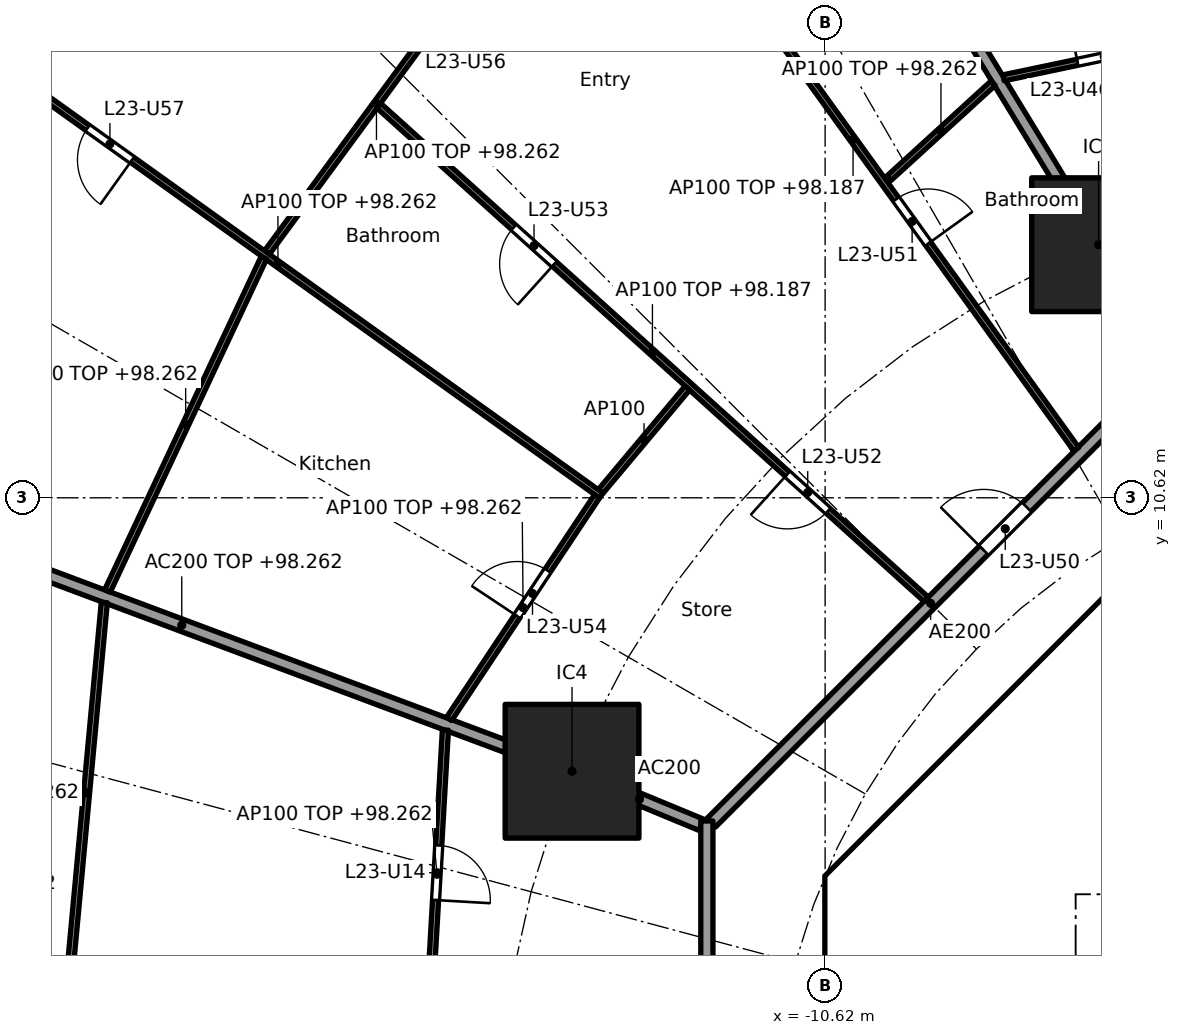
"""IFC4 building model, lengths in metres.
Left out: names, types, materials, properties, quantities, classifications, styles, units other than length and angle.
Written with IfcOpenShell. Run it as: python <this file> out.ifc"""

import sys

from ifc_helpers import new_model, si_unit, direction, frame, frame_2d, origin, origin_2d, place, context, subcontext, project, spatial, polyline, rectangle, outline, extrude, element, fill, save


model = new_model("IFC4")
c1 = context("Model", 3, precision=1e-05, world=origin(), true_north=direction((0.0, 1.0)))
c2 = subcontext(c1, "Body", "Model", "MODEL_VIEW")
j1 = project(units=[si_unit("LENGTHUNIT", "METRE"), si_unit("PLANEANGLEUNIT", "RADIAN")], contexts=[c1])
p1 = place(None, origin())
s1 = spatial("IfcSite", under=j1, at=p1, CompositionType="ELEMENT")
p2 = place(p1, origin())
s2 = spatial("IfcBuilding", under=s1, at=p2, CompositionType="ELEMENT")
p3 = place(p2, frame((0.0, 0.0, 95.5)))
s3 = spatial("IfcBuildingStorey", under=s2, at=p3, CompositionType="ELEMENT", Elevation=95.5)
for number, where, z_axis, x_axis in (
    (1, (-6.123, 14.782, 0.0), (0.0, 0.0, 1.0), (1.0, 0.0, 0.0)),
    (2, (-14.782, 6.123, 0.0), (0.0, 0.0, 1.0), (1.0, 0.0, 0.0)),
):
    element("IfcColumn", number, at=place(p3, frame(where, z_axis=z_axis, x_axis=x_axis)), inside=s3, PredefinedType="COLUMN", context=c2, shape_type="SweptSolid", body=[
        extrude(rectangle(XDim=2.2, YDim=2.2, at=origin_2d()), origin(), (0.0, 0.0, 1.0), 3.7),
    ])
p4 = place(p3, frame((-4.613, 9.988, 0.0), z_axis=(0.0, 0.0, 1.0), x_axis=(-0.707106781187, -0.707106781187, 0.0)))
e3 = element("IfcWall", 3, at=p4, inside=s3, PredefinedType="SHEAR", context=c2, shape_type="SweptSolid", body=[
    extrude(rectangle(XDim=7.602, YDim=0.6, at=frame_2d((3.801, 0.0))), origin(), (0.0, 0.0, 1.0), 3.44),
])
p5 = place(p4, frame((0.351, 0.0, 0.0)))
e4 = element("IfcOpeningElement", 4, at=p5, cuts=e3, PredefinedType="OPENING", context=c2, shape_type="SweptSolid", body=[
    extrude(rectangle(XDim=1.1, YDim=2.1, at=frame_2d((0.55, 1.05))), frame((0.0, 0.31, 0.0), z_axis=(0.0, -1.0, 0.0), x_axis=(1.0, 0.0, 0.0)), (0.0, 0.0, 1.0), 0.62),
])
p6 = place(p3, frame((-10.325, 3.801, 0.0), z_axis=(0.0, 0.0, 1.0), x_axis=(0.0, -1.0, 0.0)))
e5 = element("IfcWall", 5, at=p6, inside=s3, PredefinedType="SHEAR", context=c2, shape_type="SweptSolid", body=[
    extrude(rectangle(XDim=7.602, YDim=0.6, at=frame_2d((3.801, 0.0))), origin(), (0.0, 0.0, 1.0), 3.44),
])
p7 = place(p6, frame((0.651, 0.0, 0.0)))
e6 = element("IfcOpeningElement", 6, at=p7, cuts=e5, PredefinedType="OPENING", context=c2, shape_type="SweptSolid", body=[
    extrude(rectangle(XDim=1.5, YDim=2.1, at=frame_2d((0.75, 1.05))), frame((0.0, 0.31, 0.0), z_axis=(0.0, -1.0, 0.0), x_axis=(1.0, 0.0, 0.0)), (0.0, 0.0, 1.0), 0.62),
])
p8 = place(p6, frame((5.451, 0.0, 0.0)))
e7 = element("IfcOpeningElement", 7, at=p8, cuts=e5, PredefinedType="OPENING", context=c2, shape_type="SweptSolid", body=[
    extrude(rectangle(XDim=1.5, YDim=2.1, at=frame_2d((0.75, 1.05))), frame((0.0, 0.31, 0.0), z_axis=(0.0, -1.0, 0.0), x_axis=(1.0, 0.0, 0.0)), (0.0, 0.0, 1.0), 0.62),
])
p9 = place(p3, frame((-7.0, 4.1, 0.0), z_axis=(0.0, 0.0, 1.0), x_axis=(0.0, 1.0, 0.0)))
e8 = element("IfcWall", 8, at=p9, inside=s3, PredefinedType="PARTITIONING", context=c2, shape_type="SweptSolid", body=[
    extrude(rectangle(XDim=2.927, YDim=0.15, at=frame_2d((1.463, 0.0))), origin(), (0.0, 0.0, 1.0), 3.44),
])
p10 = place(p9, frame((1.051, 0.0, 0.0)))
e9 = element("IfcOpeningElement", 9, at=p10, cuts=e8, PredefinedType="OPENING", context=c2, shape_type="SweptSolid", body=[
    extrude(rectangle(XDim=0.9, YDim=2.1, at=frame_2d((0.45, 1.05))), frame((0.0, 0.085, 0.0), z_axis=(0.0, -1.0, 0.0), x_axis=(1.0, 0.0, 0.0)), (0.0, 0.0, 1.0), 0.17),
])
p11 = place(p3, origin())
e10 = element("IfcWall", 10, at=p11, inside=s3, PredefinedType="SHEAR", context=c2, shape_type="SweptSolid", body=[
    extrude(outline(polyline([(-10.2, 4.825), (-9.776, 4.401), (-10.025, 4.152), (-10.025, 3.801), (-10.625, 3.801), (-10.625, 4.401), (-10.2, 4.825)])), origin(), (0.0, 0.0, 1.0), 3.44),
])
p12 = place(p3, origin())
e11 = element("IfcWall", 11, at=p12, inside=s3, PredefinedType="SOLIDWALL", context=c2, shape_type="SweptSolid", body=[
    extrude(outline(polyline([(-6.5, 2.1), (-6.7, 2.1), (-6.7, 4.3), (6.7, 4.3), (6.7, 2.1), (6.5, 2.1), (6.5, 4.1), (4.5, 4.1), (4.5, 2.1), (4.3, 2.1), (4.3, 4.1), (2.3, 4.1), (2.3, 2.1), (2.1, 2.1), (2.1, 4.1), (0.1, 4.1), (0.1, 2.1), (-0.1, 2.1), (-0.1, 4.1), (-2.1, 4.1), (-2.1, 2.1), (-2.3, 2.1), (-2.3, 4.1), (-4.3, 4.1), (-4.3, 2.1), (-4.5, 2.1), (-4.5, 4.1), (-6.5, 4.1), (-6.5, 2.1)])), origin(), (0.0, 0.0, 1.0), 3.44),
])
p13 = place(p3, frame((-10.025, 4.0, 0.0), z_axis=(0.0, 0.0, 1.0), x_axis=(1.0, 0.0, 0.0)))
e12 = element("IfcWall", 12, at=p13, inside=s3, PredefinedType="PARTITIONING", context=c2, shape_type="SweptSolid", body=[
    extrude(rectangle(XDim=3.325, YDim=0.2, at=frame_2d((1.662, 0.0))), origin(), (0.0, 0.0, 1.0), 3.44),
])
p14 = place(p3, frame((-5.243, 12.657, 0.0), z_axis=(0.0, 0.0, 1.0), x_axis=(-0.38273085373, 0.923859888513, 0.0)))
e13 = element("IfcWall", 13, at=p14, inside=s3, PredefinedType="PARTITIONING", context=c2, shape_type="SweptSolid", body=[
    extrude(rectangle(XDim=2.199, YDim=0.2, at=frame_2d((1.1, 0.0))), origin(), (0.0, 0.0, 1.0), 3.44),
])
p15 = place(p3, frame((-6.149, 14.825, 0.0), z_axis=(0.0, 0.0, 1.0), x_axis=(-0.520412862249, 0.853914780763, 0.0)))
e14 = element("IfcWall", 14, at=p15, inside=s3, PredefinedType="PARTITIONING", context=c2, shape_type="SweptSolid", body=[
    extrude(rectangle(XDim=17.202, YDim=0.2, at=frame_2d((8.601, 0.0))), origin(), (0.0, 0.0, 1.0), 2.762),
])
p16 = place(p3, frame((-12.657, 5.243, 0.0), z_axis=(0.0, 0.0, 1.0), x_axis=(-0.923843626288, 0.382770106157, 0.0)))
e15 = element("IfcWall", 15, at=p16, inside=s3, PredefinedType="PARTITIONING", context=c2, shape_type="SweptSolid", body=[
    extrude(rectangle(XDim=2.199, YDim=0.2, at=frame_2d((1.1, 0.0))), origin(), (0.0, 0.0, 1.0), 3.44),
])
p17 = place(p3, frame((-14.829, 6.14, 0.0), z_axis=(0.0, 0.0, 1.0), x_axis=(-0.936597324342, 0.35040755134, 0.0)))
e16 = element("IfcWall", 16, at=p17, inside=s3, PredefinedType="PARTITIONING", context=c2, shape_type="SweptSolid", body=[
    extrude(rectangle(XDim=13.606, YDim=0.2, at=frame_2d((6.803, 0.0))), origin(), (0.0, 0.0, 1.0), 2.762),
])
p18 = place(p3, frame((-5.275, 12.494, 0.0), z_axis=(0.0, 0.0, 1.0), x_axis=(-0.707106781187, -0.707106781187, 0.0)))
e17 = element("IfcWall", 17, at=p18, inside=s3, PredefinedType="PARTITIONING", context=c2, shape_type="SweptSolid", body=[
    extrude(rectangle(XDim=10.209, YDim=0.2, at=frame_2d((5.104, 0.0))), origin(), (0.0, 0.0, 1.0), 3.44),
])
p19 = place(p18, frame((2.87, 0.0, 0.0)))
e18 = element("IfcOpeningElement", 18, at=p19, cuts=e17, PredefinedType="OPENING", context=c2, shape_type="SweptSolid", body=[
    extrude(rectangle(XDim=1.0, YDim=2.1, at=frame_2d((0.5, 1.05))), frame((0.0, 0.11, 0.0), z_axis=(0.0, -1.0, 0.0), x_axis=(1.0, 0.0, 0.0)), (0.0, 0.0, 1.0), 0.22),
])
p20 = place(p3, frame((-12.565, 5.304, 0.0), z_axis=(0.0, 0.0, 1.0), x_axis=(0.0, -1.0, 0.0)))
e19 = element("IfcWall", 19, at=p20, inside=s3, PredefinedType="PARTITIONING", context=c2, shape_type="SweptSolid", body=[
    extrude(rectangle(XDim=10.409, YDim=0.2, at=frame_2d((5.205, 0.0))), origin(), (0.0, 0.0, 1.0), 3.44),
])
p21 = place(p3, frame((-4.37, 18.223, 0.0), z_axis=(0.0, 0.0, 1.0), x_axis=(-0.978633053291, -0.205614559323, 0.0)))
e20 = element("IfcWall", 20, at=p21, inside=s3, PredefinedType="PARTITIONING", context=c2, shape_type="SweptSolid", body=[
    extrude(rectangle(XDim=3.387, YDim=0.1, at=frame_2d((1.694, 0.0))), origin(), (0.0, 0.0, 1.0), 2.762),
])
p22 = place(p21, frame((1.244, 0.0, 0.0)))
e21 = element("IfcOpeningElement", 21, at=p22, cuts=e20, PredefinedType="OPENING", context=c2, shape_type="SweptSolid", body=[
    extrude(rectangle(XDim=0.9, YDim=2.1, at=frame_2d((0.45, 1.05))), frame((0.0, 0.06, 0.0), z_axis=(0.0, -1.0, 0.0), x_axis=(1.0, 0.0, 0.0)), (0.0, 0.0, 1.0), 0.12),
])
p23 = place(p3, frame((-7.857, 17.438, 0.0), z_axis=(0.0, 0.0, 1.0), x_axis=(-0.738883513135, -0.673833179665, 0.0)))
e22 = element("IfcWall", 22, at=p23, inside=s3, PredefinedType="PARTITIONING", context=c2, shape_type="SweptSolid", body=[
    extrude(rectangle(XDim=2.323, YDim=0.1, at=frame_2d((1.162, 0.0))), origin(), (0.0, 0.0, 1.0), 2.762),
])
p24 = place(p3, frame((-6.49, 11.419, 0.0), z_axis=(0.0, 0.0, 1.0), x_axis=(-0.584832823883, 0.811153849839, 0.0)))
e23 = element("IfcWall", 23, at=p24, inside=s3, PredefinedType="PARTITIONING", context=c2, shape_type="SweptSolid", body=[
    extrude(rectangle(XDim=12.553, YDim=0.1, at=frame_2d((6.277, 0.0))), origin(), (0.0, 0.0, 1.0), 2.687),
])
p25 = place(p24, frame((4.166, 0.0, 0.0)))
e24 = element("IfcOpeningElement", 24, at=p25, cuts=e23, PredefinedType="OPENING", context=c2, shape_type="SweptSolid", body=[
    extrude(rectangle(XDim=0.9, YDim=2.1, at=frame_2d((0.45, 1.05))), frame((0.0, 0.06, 0.0), z_axis=(0.0, -1.0, 0.0), x_axis=(1.0, 0.0, 0.0)), (0.0, 0.0, 1.0), 0.12),
])
p26 = place(p3, frame((-16.197, 19.551, 0.0), z_axis=(0.0, 0.0, 1.0), x_axis=(-0.592391983588, -0.80564988536, 0.0)))
e25 = element("IfcWall", 25, at=p26, inside=s3, PredefinedType="PARTITIONING", context=c2, shape_type="SweptSolid", body=[
    extrude(rectangle(XDim=6.08, YDim=0.1, at=frame_2d((3.04, 0.0))), origin(), (0.0, 0.0, 1.0), 2.762),
])
p27 = place(p26, frame((1.07, 0.0, 0.0)))
e26 = element("IfcOpeningElement", 26, at=p27, cuts=e25, PredefinedType="OPENING", context=c2, shape_type="SweptSolid", body=[
    extrude(rectangle(XDim=0.9, YDim=2.1, at=frame_2d((0.45, 1.05))), frame((0.0, 0.06, 0.0), z_axis=(0.0, -1.0, 0.0), x_axis=(1.0, 0.0, 0.0)), (0.0, 0.0, 1.0), 0.12),
])
p28 = place(p3, frame((-8.959, 8.952, 0.0), z_axis=(0.0, 0.0, 1.0), x_axis=(-0.742679904999, 0.669646592398, 0.0)))
e27 = element("IfcWall", 27, at=p28, inside=s3, PredefinedType="PARTITIONING", context=c2, shape_type="SweptSolid", body=[
    extrude(rectangle(XDim=12.121, YDim=0.1, at=frame_2d((6.061, 0.0))), origin(), (0.0, 0.0, 1.0), 2.687),
])
p29 = place(p28, frame((2.172, 0.0, 0.0)))
e28 = element("IfcOpeningElement", 28, at=p29, cuts=e27, PredefinedType="OPENING", context=c2, shape_type="SweptSolid", body=[
    extrude(rectangle(XDim=0.9, YDim=2.1, at=frame_2d((0.45, 1.05))), frame((0.0, 0.06, 0.0), z_axis=(0.0, -1.0, 0.0), x_axis=(1.0, 0.0, 0.0)), (0.0, 0.0, 1.0), 0.12),
])
p30 = place(p28, frame((8.233, 0.0, 0.0)))
e29 = element("IfcOpeningElement", 29, at=p30, cuts=e27, PredefinedType="OPENING", context=c2, shape_type="SweptSolid", body=[
    extrude(rectangle(XDim=0.9, YDim=2.1, at=frame_2d((0.45, 1.05))), frame((0.0, 0.06, 0.0), z_axis=(0.0, -1.0, 0.0), x_axis=(1.0, 0.0, 0.0)), (0.0, 0.0, 1.0), 0.12),
])
p31 = place(p3, frame((-12.885, 12.425, 0.0), z_axis=(0.0, 0.0, 1.0), x_axis=(-0.642551826067, -0.766242227248, 0.0)))
e30 = element("IfcWall", 30, at=p31, inside=s3, PredefinedType="PARTITIONING", context=c2, shape_type="SweptSolid", body=[
    extrude(rectangle(XDim=2.219, YDim=0.1, at=frame_2d((1.109, 0.0))), origin(), (0.0, 0.0, 1.0), 3.44),
])
p32 = place(p3, frame((-14.302, 10.657, 0.0), z_axis=(0.0, 0.0, 1.0), x_axis=(-0.813183002698, 0.582008079087, 0.0)))
e31 = element("IfcWall", 31, at=p32, inside=s3, PredefinedType="PARTITIONING", context=c2, shape_type="SweptSolid", body=[
    extrude(rectangle(XDim=13.074, YDim=0.1, at=frame_2d((6.537, 0.0))), origin(), (0.0, 0.0, 1.0), 2.762),
])
p33 = place(p32, frame((9.485, 0.0, 0.0)))
e32 = element("IfcOpeningElement", 32, at=p33, cuts=e31, PredefinedType="OPENING", context=c2, shape_type="SweptSolid", body=[
    extrude(rectangle(XDim=0.9, YDim=2.1, at=frame_2d((0.45, 1.05))), frame((0.0, 0.06, 0.0), z_axis=(0.0, -1.0, 0.0), x_axis=(1.0, 0.0, 0.0)), (0.0, 0.0, 1.0), 0.12),
])
p34 = place(p3, frame((-14.371, 10.645, 0.0), z_axis=(0.0, 0.0, 1.0), x_axis=(-0.553341009285, -0.832954817168, 0.0)))
e33 = element("IfcWall", 33, at=p34, inside=s3, PredefinedType="PARTITIONING", context=c2, shape_type="SweptSolid", body=[
    extrude(rectangle(XDim=4.396, YDim=0.1, at=frame_2d((2.198, 0.0))), origin(), (0.0, 0.0, 1.0), 2.762),
])
p35 = place(p34, frame((1.469, 0.0, 0.0)))
e34 = element("IfcOpeningElement", 34, at=p35, cuts=e33, PredefinedType="OPENING", context=c2, shape_type="SweptSolid", body=[
    extrude(rectangle(XDim=0.9, YDim=2.1, at=frame_2d((0.45, 1.05))), frame((0.0, 0.06, 0.0), z_axis=(0.0, -1.0, 0.0), x_axis=(1.0, 0.0, 0.0)), (0.0, 0.0, 1.0), 0.12),
])
p36 = place(p3, frame((-19.85, 14.567, 0.0), z_axis=(0.0, 0.0, 1.0), x_axis=(-0.424942210745, -0.905220480064, 0.0)))
e35 = element("IfcWall", 35, at=p36, inside=s3, PredefinedType="PARTITIONING", context=c2, shape_type="SweptSolid", body=[
    extrude(rectangle(XDim=6.053, YDim=0.1, at=frame_2d((3.027, 0.0))), origin(), (0.0, 0.0, 1.0), 2.762),
])
p37 = place(p3, frame((-16.865, 6.8, 0.0), z_axis=(0.0, 0.0, 1.0), x_axis=(-0.05777584434, -0.998329580755, 0.0)))
e36 = element("IfcWall", 36, at=p37, inside=s3, PredefinedType="PARTITIONING", context=c2, shape_type="SweptSolid", body=[
    extrude(rectangle(XDim=4.75, YDim=0.1, at=frame_2d((2.375, 0.0))), origin(), (0.0, 0.0, 1.0), 2.762),
])
p38 = place(p37, frame((1.9, 0.0, 0.0)))
e37 = element("IfcOpeningElement", 37, at=p38, cuts=e36, PredefinedType="OPENING", context=c2, shape_type="SweptSolid", body=[
    extrude(rectangle(XDim=0.9, YDim=2.1, at=frame_2d((0.45, 1.05))), frame((0.0, 0.06, 0.0), z_axis=(0.0, -1.0, 0.0), x_axis=(1.0, 0.0, 0.0)), (0.0, 0.0, 1.0), 0.12),
])
p39 = place(p3, frame((-22.474, 8.898, 0.0), z_axis=(0.0, 0.0, 1.0), x_axis=(-0.092756864489, -0.995688788774, 0.0)))
e38 = element("IfcWall", 38, at=p39, inside=s3, PredefinedType="PARTITIONING", context=c2, shape_type="SweptSolid", body=[
    extrude(rectangle(XDim=6.283, YDim=0.1, at=frame_2d((3.141, 0.0))), origin(), (0.0, 0.0, 1.0), 2.762),
])
p40 = place(p10, origin())
e39 = element("IfcDoor", 39, at=p40, inside=s3, OperationType="SINGLE_SWING_LEFT", PredefinedType="DOOR", context=c2, shape_type="SweptSolid", body=[
    extrude(rectangle(XDim=0.9, YDim=2.1, at=frame_2d((0.45, 1.05))), frame((0.0, 0.025, 0.0), z_axis=(0.0, -1.0, 0.0), x_axis=(1.0, 0.0, 0.0)), (0.0, 0.0, 1.0), 0.05),
])
fill(e9, e39)
p41 = place(p7, origin())
e40 = element("IfcDoor", 40, at=p41, inside=s3, OperationType="DOUBLE_DOOR_SINGLE_SWING", PredefinedType="DOOR", context=c2, shape_type="SweptSolid", body=[
    extrude(rectangle(XDim=1.5, YDim=2.1, at=frame_2d((0.75, 1.05))), frame((0.0, 0.025, 0.0), z_axis=(0.0, -1.0, 0.0), x_axis=(1.0, 0.0, 0.0)), (0.0, 0.0, 1.0), 0.05),
])
fill(e6, e40)
p42 = place(p38, origin())
e41 = element("IfcDoor", 41, at=p42, inside=s3, OperationType="SINGLE_SWING_RIGHT", PredefinedType="DOOR", context=c2, shape_type="SweptSolid", body=[
    extrude(rectangle(XDim=0.9, YDim=2.1, at=frame_2d((0.45, 1.05))), frame((0.0, 0.025, 0.0), z_axis=(0.0, -1.0, 0.0), x_axis=(1.0, 0.0, 0.0)), (0.0, 0.0, 1.0), 0.05),
])
fill(e37, e41)
p43 = place(p22, frame((0.9, 0.0, 0.0), x_axis=(-1.0, 0.0, 0.0)))
e42 = element("IfcDoor", 42, at=p43, inside=s3, OperationType="SINGLE_SWING_LEFT", PredefinedType="DOOR", context=c2, shape_type="SweptSolid", body=[
    extrude(rectangle(XDim=0.9, YDim=2.1, at=frame_2d((0.45, 1.05))), frame((0.0, 0.025, 0.0), z_axis=(0.0, -1.0, 0.0), x_axis=(1.0, 0.0, 0.0)), (0.0, 0.0, 1.0), 0.05),
])
fill(e21, e42)
p44 = place(p19, frame((1.0, 0.0, 0.0), x_axis=(-1.0, 0.0, 0.0)))
e43 = element("IfcDoor", 43, at=p44, inside=s3, OperationType="SINGLE_SWING_LEFT", PredefinedType="DOOR", context=c2, shape_type="SweptSolid", body=[
    extrude(rectangle(XDim=1.0, YDim=2.1, at=frame_2d((0.5, 1.05))), frame((0.0, 0.025, 0.0), z_axis=(0.0, -1.0, 0.0), x_axis=(1.0, 0.0, 0.0)), (0.0, 0.0, 1.0), 0.05),
])
fill(e18, e43)
p45 = place(p25, frame((0.9, 0.0, 0.0), x_axis=(-1.0, 0.0, 0.0)))
e44 = element("IfcDoor", 44, at=p45, inside=s3, OperationType="SINGLE_SWING_RIGHT", PredefinedType="DOOR", context=c2, shape_type="SweptSolid", body=[
    extrude(rectangle(XDim=0.9, YDim=2.1, at=frame_2d((0.45, 1.05))), frame((0.0, 0.025, 0.0), z_axis=(0.0, -1.0, 0.0), x_axis=(1.0, 0.0, 0.0)), (0.0, 0.0, 1.0), 0.05),
])
fill(e24, e44)
p46 = place(p29, origin())
e45 = element("IfcDoor", 45, at=p46, inside=s3, OperationType="SINGLE_SWING_RIGHT", PredefinedType="DOOR", context=c2, shape_type="SweptSolid", body=[
    extrude(rectangle(XDim=0.9, YDim=2.1, at=frame_2d((0.45, 1.05))), frame((0.0, 0.025, 0.0), z_axis=(0.0, -1.0, 0.0), x_axis=(1.0, 0.0, 0.0)), (0.0, 0.0, 1.0), 0.05),
])
fill(e28, e45)
p47 = place(p30, origin())
e46 = element("IfcDoor", 46, at=p47, inside=s3, OperationType="SINGLE_SWING_LEFT", PredefinedType="DOOR", context=c2, shape_type="SweptSolid", body=[
    extrude(rectangle(XDim=0.9, YDim=2.1, at=frame_2d((0.45, 1.05))), frame((0.0, 0.025, 0.0), z_axis=(0.0, -1.0, 0.0), x_axis=(1.0, 0.0, 0.0)), (0.0, 0.0, 1.0), 0.05),
])
fill(e29, e46)
p48 = place(p35, frame((0.9, 0.0, 0.0), x_axis=(-1.0, 0.0, 0.0)))
e47 = element("IfcDoor", 47, at=p48, inside=s3, OperationType="SINGLE_SWING_LEFT", PredefinedType="DOOR", context=c2, shape_type="SweptSolid", body=[
    extrude(rectangle(XDim=0.9, YDim=2.1, at=frame_2d((0.45, 1.05))), frame((0.0, 0.025, 0.0), z_axis=(0.0, -1.0, 0.0), x_axis=(1.0, 0.0, 0.0)), (0.0, 0.0, 1.0), 0.05),
])
fill(e34, e47)
p49 = place(p27, frame((0.9, 0.0, 0.0), x_axis=(-1.0, 0.0, 0.0)))
e48 = element("IfcDoor", 48, at=p49, inside=s3, OperationType="SINGLE_SWING_LEFT", PredefinedType="DOOR", context=c2, shape_type="SweptSolid", body=[
    extrude(rectangle(XDim=0.9, YDim=2.1, at=frame_2d((0.45, 1.05))), frame((0.0, 0.025, 0.0), z_axis=(0.0, -1.0, 0.0), x_axis=(1.0, 0.0, 0.0)), (0.0, 0.0, 1.0), 0.05),
])
fill(e26, e48)
p50 = place(p33, origin())
e49 = element("IfcDoor", 49, at=p50, inside=s3, OperationType="SINGLE_SWING_LEFT", PredefinedType="DOOR", context=c2, shape_type="SweptSolid", body=[
    extrude(rectangle(XDim=0.9, YDim=2.1, at=frame_2d((0.45, 1.05))), frame((0.0, 0.025, 0.0), z_axis=(0.0, -1.0, 0.0), x_axis=(1.0, 0.0, 0.0)), (0.0, 0.0, 1.0), 0.05),
])
fill(e32, e49)
save(model, sys.argv[1])
